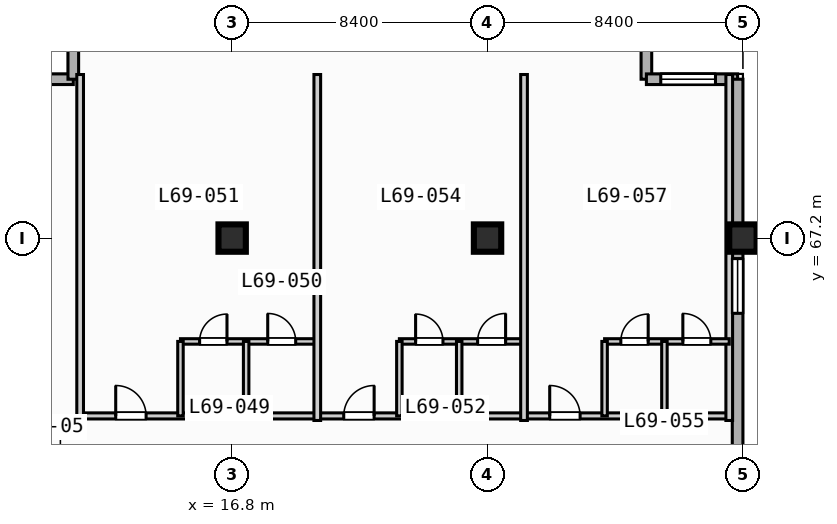
"""IFC4 building model, lengths in metres.
Left out: names, types, materials, properties, quantities, classifications, styles, units other than length and angle.
Written with IfcOpenShell. Run it as: python <this file> out.ifc"""

import sys

from ifc_helpers import new_model, si_unit, direction, frame, frame_2d, origin, origin_2d, place, context, subcontext, project, spatial, rectangle, extrude, element, fill, save


model = new_model("IFC4")
c1 = context("Model", 3, precision=1e-05, world=origin(), true_north=direction((0.0, 1.0)))
c2 = subcontext(c1, "Body", "Model", "MODEL_VIEW")
j1 = project(units=[si_unit("LENGTHUNIT", "METRE"), si_unit("PLANEANGLEUNIT", "RADIAN")], contexts=[c1])
p1 = place(None, origin())
s1 = spatial("IfcSite", under=j1, at=p1, CompositionType="ELEMENT")
p2 = place(p1, origin())
s2 = spatial("IfcBuilding", under=s1, at=p2, CompositionType="ELEMENT")
p3 = place(p2, frame((0.0, 0.0, 278.6)))
s3 = spatial("IfcBuildingStorey", under=s2, at=p3, CompositionType="ELEMENT", Elevation=278.6)
for number, where, z_axis, x_axis in (
    (1, (16.8, 67.2, 0.0), (0.0, 0.0, 1.0), (1.0, 0.0, 0.0)),
    (2, (25.2, 67.2, 0.0), (0.0, 0.0, 1.0), (1.0, 0.0, 0.0)),
    (3, (33.6, 67.2, 0.0), (0.0, 0.0, 1.0), (1.0, 0.0, 0.0)),
):
    element("IfcColumn", number, at=place(p3, frame(where, z_axis=z_axis, x_axis=x_axis)), inside=s3, PredefinedType="COLUMN", context=c2, shape_type="SweptSolid", body=[
        extrude(rectangle(XDim=0.9, YDim=0.9, at=origin_2d()), origin(), (0.0, 0.0, 1.0), 3.7),
    ])
for number, where, z_axis, x_axis in (
    (4, (8.575, 72.425, 0.0), (0.0, 0.0, 1.0), (1.0, 0.0, 0.0)),
    (5, (11.575, 72.425, 0.0), (0.0, 0.0, 1.0), (0.0, 1.0, 0.0)),
    (6, (30.425, 75.425, 0.0), (0.0, 0.0, 1.0), (0.0, -1.0, 0.0)),
):
    element("IfcWall", number, at=place(p3, frame(where, z_axis=z_axis, x_axis=x_axis)), inside=s3, PredefinedType="STANDARD", context=c2, shape_type="SweptSolid", body=[
        extrude(rectangle(XDim=3.0, YDim=0.35, at=frame_2d((1.5, 0.0))), origin(), (0.0, 0.0, 1.0), 3.47),
    ])
p4 = place(p3, frame((30.425, 72.425, 0.0), z_axis=(0.0, 0.0, 1.0), x_axis=(1.0, 0.0, 0.0)))
e7 = element("IfcWall", 7, at=p4, inside=s3, PredefinedType="STANDARD", context=c2, shape_type="SweptSolid", body=[
    extrude(rectangle(XDim=3.0, YDim=0.35, at=frame_2d((1.5, 0.0))), origin(), (0.0, 0.0, 1.0), 3.47),
])
p5 = place(p4, frame((0.472, 0.0, 0.85)))
e8 = element("IfcOpeningElement", 8, at=p5, cuts=e7, PredefinedType="OPENING", context=c2, shape_type="SweptSolid", body=[
    extrude(rectangle(XDim=1.8, YDim=1.8, at=frame_2d((0.9, 0.9))), frame((0.0, 0.185, 0.0), z_axis=(0.0, -1.0, 0.0), x_axis=(1.0, 0.0, 0.0)), (0.0, 0.0, 1.0), 0.37),
])
p6 = place(p3, frame((33.425, 72.425, 0.0), z_axis=(0.0, 0.0, 1.0), x_axis=(0.0, -1.0, 0.0)))
e9 = element("IfcWall", 9, at=p6, inside=s3, PredefinedType="STANDARD", context=c2, shape_type="SweptSolid", body=[
    extrude(rectangle(XDim=39.0, YDim=0.35, at=frame_2d((19.5, 0.0))), origin(), (0.0, 0.0, 1.0), 3.47),
])
p7 = place(p6, frame((5.9, 0.0, 0.85)))
e10 = element("IfcOpeningElement", 10, at=p7, cuts=e9, PredefinedType="OPENING", context=c2, shape_type="SweptSolid", body=[
    extrude(rectangle(XDim=1.8, YDim=1.8, at=frame_2d((0.9, 0.9))), frame((0.0, 0.185, 0.0), z_axis=(0.0, -1.0, 0.0), x_axis=(1.0, 0.0, 0.0)), (0.0, 0.0, 1.0), 0.37),
])
p8 = place(p3, frame((11.8, 61.35, 0.0), z_axis=(0.0, 0.0, 1.0), x_axis=(1.0, 0.0, 0.0)))
e11 = element("IfcWall", 11, at=p8, inside=s3, PredefinedType="PARTITIONING", context=c2, shape_type="SweptSolid", body=[
    extrude(rectangle(XDim=21.35, YDim=0.2, at=frame_2d((10.675, 0.0))), origin(), (0.0, 0.0, 1.0), 3.47),
])
p9 = place(p8, frame((1.17, 0.0, 0.0)))
e12 = element("IfcOpeningElement", 12, at=p9, cuts=e11, PredefinedType="OPENING", context=c2, shape_type="SweptSolid", body=[
    extrude(rectangle(XDim=1.0, YDim=2.15, at=frame_2d((0.5, 1.075))), frame((0.0, 0.11, 0.0), z_axis=(0.0, -1.0, 0.0), x_axis=(1.0, 0.0, 0.0)), (0.0, 0.0, 1.0), 0.22),
])
p10 = place(p8, frame((8.67, 0.0, 0.0)))
e13 = element("IfcOpeningElement", 13, at=p10, cuts=e11, PredefinedType="OPENING", context=c2, shape_type="SweptSolid", body=[
    extrude(rectangle(XDim=1.0, YDim=2.15, at=frame_2d((0.5, 1.075))), frame((0.0, 0.11, 0.0), z_axis=(0.0, -1.0, 0.0), x_axis=(1.0, 0.0, 0.0)), (0.0, 0.0, 1.0), 0.22),
])
p11 = place(p8, frame((15.445, 0.0, 0.0)))
e14 = element("IfcOpeningElement", 14, at=p11, cuts=e11, PredefinedType="OPENING", context=c2, shape_type="SweptSolid", body=[
    extrude(rectangle(XDim=1.0, YDim=2.15, at=frame_2d((0.5, 1.075))), frame((0.0, 0.11, 0.0), z_axis=(0.0, -1.0, 0.0), x_axis=(1.0, 0.0, 0.0)), (0.0, 0.0, 1.0), 0.22),
])
p12 = place(p3, frame((11.8, 61.2, 0.0), z_axis=(0.0, 0.0, 1.0), x_axis=(0.0, 1.0, 0.0)))
e15 = element("IfcWall", 15, at=p12, inside=s3, PredefinedType="PARTITIONING", context=c2, shape_type="SweptSolid", body=[
    extrude(rectangle(XDim=11.38, YDim=0.22, at=frame_2d((5.69, 0.0))), origin(), (0.0, 0.0, 1.0), 3.47),
])
p13 = place(p3, frame((15.1, 63.8, 0.0), z_axis=(0.0, 0.0, 1.0), x_axis=(1.0, 0.0, 0.0)))
e16 = element("IfcWall", 16, at=p13, inside=s3, PredefinedType="PLUMBINGWALL", context=c2, shape_type="SweptSolid", body=[
    extrude(rectangle(XDim=4.5, YDim=0.18, at=frame_2d((2.25, 0.0))), origin(), (0.0, 0.0, 1.0), 3.47),
])
p14 = place(p13, frame((0.63, 0.0, 0.0)))
e17 = element("IfcOpeningElement", 17, at=p14, cuts=e16, PredefinedType="OPENING", context=c2, shape_type="SweptSolid", body=[
    extrude(rectangle(XDim=0.9, YDim=2.1, at=frame_2d((0.45, 1.05))), frame((0.0, 0.1, 0.0), z_axis=(0.0, -1.0, 0.0), x_axis=(1.0, 0.0, 0.0)), (0.0, 0.0, 1.0), 0.2),
])
p15 = place(p13, frame((2.87, 0.0, 0.0)))
e18 = element("IfcOpeningElement", 18, at=p15, cuts=e16, PredefinedType="OPENING", context=c2, shape_type="SweptSolid", body=[
    extrude(rectangle(XDim=0.92, YDim=2.1, at=frame_2d((0.46, 1.05))), frame((0.0, 0.1, 0.0), z_axis=(0.0, -1.0, 0.0), x_axis=(1.0, 0.0, 0.0)), (0.0, 0.0, 1.0), 0.2),
])
for number, where, z_axis, x_axis in (
    (19, (15.1, 61.35, 0.0), (0.0, 0.0, 1.0), (0.0, 1.0, 0.0)),
    (20, (17.26, 61.35, 0.0), (0.0, 0.0, 1.0), (0.0, 1.0, 0.0)),
):
    element("IfcWall", number, at=place(p3, frame(where, z_axis=z_axis, x_axis=x_axis)), inside=s3, PredefinedType="PLUMBINGWALL", context=c2, shape_type="SweptSolid", body=[
        extrude(rectangle(XDim=2.45, YDim=0.18, at=frame_2d((1.225, 0.0))), origin(), (0.0, 0.0, 1.0), 3.47),
    ])
p16 = place(p3, frame((19.6, 61.2, 0.0), z_axis=(0.0, 0.0, 1.0), x_axis=(0.0, 1.0, 0.0)))
e21 = element("IfcWall", 21, at=p16, inside=s3, PredefinedType="PARTITIONING", context=c2, shape_type="SweptSolid", body=[
    extrude(rectangle(XDim=11.38, YDim=0.22, at=frame_2d((5.69, 0.0))), origin(), (0.0, 0.0, 1.0), 3.47),
])
p17 = place(p3, frame((22.3, 63.8, 0.0), z_axis=(0.0, 0.0, 1.0), x_axis=(1.0, 0.0, 0.0)))
e22 = element("IfcWall", 22, at=p17, inside=s3, PredefinedType="PLUMBINGWALL", context=c2, shape_type="SweptSolid", body=[
    extrude(rectangle(XDim=4.1, YDim=0.18, at=frame_2d((2.05, 0.0))), origin(), (0.0, 0.0, 1.0), 3.47),
])
p18 = place(p17, frame((0.534, 0.0, 0.0)))
e23 = element("IfcOpeningElement", 23, at=p18, cuts=e22, PredefinedType="OPENING", context=c2, shape_type="SweptSolid", body=[
    extrude(rectangle(XDim=0.9, YDim=2.1, at=frame_2d((0.45, 1.05))), frame((0.0, 0.1, 0.0), z_axis=(0.0, -1.0, 0.0), x_axis=(1.0, 0.0, 0.0)), (0.0, 0.0, 1.0), 0.2),
])
p19 = place(p17, frame((2.574, 0.0, 0.0)))
e24 = element("IfcOpeningElement", 24, at=p19, cuts=e22, PredefinedType="OPENING", context=c2, shape_type="SweptSolid", body=[
    extrude(rectangle(XDim=0.92, YDim=2.1, at=frame_2d((0.46, 1.05))), frame((0.0, 0.1, 0.0), z_axis=(0.0, -1.0, 0.0), x_axis=(1.0, 0.0, 0.0)), (0.0, 0.0, 1.0), 0.2),
])
for number, where, z_axis, x_axis in (
    (25, (22.3, 61.35, 0.0), (0.0, 0.0, 1.0), (0.0, 1.0, 0.0)),
    (26, (24.268, 61.35, 0.0), (0.0, 0.0, 1.0), (0.0, 1.0, 0.0)),
):
    element("IfcWall", number, at=place(p3, frame(where, z_axis=z_axis, x_axis=x_axis)), inside=s3, PredefinedType="PLUMBINGWALL", context=c2, shape_type="SweptSolid", body=[
        extrude(rectangle(XDim=2.45, YDim=0.18, at=frame_2d((1.225, 0.0))), origin(), (0.0, 0.0, 1.0), 3.47),
    ])
for number, where, z_axis, x_axis in (
    (27, (26.4, 61.2, 0.0), (0.0, 0.0, 1.0), (0.0, 1.0, 0.0)),
    (28, (33.15, 61.2, 0.0), (0.0, 0.0, 1.0), (0.0, 1.0, 0.0)),
):
    element("IfcWall", number, at=place(p3, frame(where, z_axis=z_axis, x_axis=x_axis)), inside=s3, PredefinedType="PARTITIONING", context=c2, shape_type="SweptSolid", body=[
        extrude(rectangle(XDim=11.38, YDim=0.22, at=frame_2d((5.69, 0.0))), origin(), (0.0, 0.0, 1.0), 3.47),
    ])
p20 = place(p3, frame((29.05, 63.8, 0.0), z_axis=(0.0, 0.0, 1.0), x_axis=(1.0, 0.0, 0.0)))
e29 = element("IfcWall", 29, at=p20, inside=s3, PredefinedType="PLUMBINGWALL", context=c2, shape_type="SweptSolid", body=[
    extrude(rectangle(XDim=4.1, YDim=0.18, at=frame_2d((2.05, 0.0))), origin(), (0.0, 0.0, 1.0), 3.47),
])
p21 = place(p20, frame((0.534, 0.0, 0.0)))
e30 = element("IfcOpeningElement", 30, at=p21, cuts=e29, PredefinedType="OPENING", context=c2, shape_type="SweptSolid", body=[
    extrude(rectangle(XDim=0.9, YDim=2.1, at=frame_2d((0.45, 1.05))), frame((0.0, 0.1, 0.0), z_axis=(0.0, -1.0, 0.0), x_axis=(1.0, 0.0, 0.0)), (0.0, 0.0, 1.0), 0.2),
])
p22 = place(p20, frame((2.574, 0.0, 0.0)))
e31 = element("IfcOpeningElement", 31, at=p22, cuts=e29, PredefinedType="OPENING", context=c2, shape_type="SweptSolid", body=[
    extrude(rectangle(XDim=0.92, YDim=2.1, at=frame_2d((0.46, 1.05))), frame((0.0, 0.1, 0.0), z_axis=(0.0, -1.0, 0.0), x_axis=(1.0, 0.0, 0.0)), (0.0, 0.0, 1.0), 0.2),
])
for number, where, z_axis, x_axis in (
    (32, (29.05, 61.35, 0.0), (0.0, 0.0, 1.0), (0.0, 1.0, 0.0)),
    (33, (31.018, 61.35, 0.0), (0.0, 0.0, 1.0), (0.0, 1.0, 0.0)),
):
    element("IfcWall", number, at=place(p3, frame(where, z_axis=z_axis, x_axis=x_axis)), inside=s3, PredefinedType="PLUMBINGWALL", context=c2, shape_type="SweptSolid", body=[
        extrude(rectangle(XDim=2.45, YDim=0.18, at=frame_2d((1.225, 0.0))), origin(), (0.0, 0.0, 1.0), 3.47),
    ])
p23 = place(p5, origin())
e34 = element("IfcWindow", 34, at=p23, inside=s3, PartitioningType="SINGLE_PANEL", PredefinedType="WINDOW", context=c2, shape_type="SweptSolid", body=[
    extrude(rectangle(XDim=1.8, YDim=1.8, at=frame_2d((0.9, 0.9))), frame((0.0, 0.03, 0.0), z_axis=(0.0, -1.0, 0.0), x_axis=(1.0, 0.0, 0.0)), (0.0, 0.0, 1.0), 0.06),
])
fill(e8, e34)
p24 = place(p7, origin())
e35 = element("IfcWindow", 35, at=p24, inside=s3, PartitioningType="SINGLE_PANEL", PredefinedType="WINDOW", context=c2, shape_type="SweptSolid", body=[
    extrude(rectangle(XDim=1.8, YDim=1.8, at=frame_2d((0.9, 0.9))), frame((0.0, 0.03, 0.0), z_axis=(0.0, -1.0, 0.0), x_axis=(1.0, 0.0, 0.0)), (0.0, 0.0, 1.0), 0.06),
])
fill(e10, e35)
p25 = place(p9, origin())
e36 = element("IfcDoor", 36, at=p25, inside=s3, OperationType="SINGLE_SWING_LEFT", PredefinedType="DOOR", context=c2, shape_type="SweptSolid", body=[
    extrude(rectangle(XDim=1.0, YDim=2.15, at=frame_2d((0.5, 1.075))), frame((0.0, 0.025, 0.0), z_axis=(0.0, -1.0, 0.0), x_axis=(1.0, 0.0, 0.0)), (0.0, 0.0, 1.0), 0.05),
])
fill(e12, e36)
p26 = place(p10, origin())
e37 = element("IfcDoor", 37, at=p26, inside=s3, OperationType="SINGLE_SWING_RIGHT", PredefinedType="DOOR", context=c2, shape_type="SweptSolid", body=[
    extrude(rectangle(XDim=1.0, YDim=2.15, at=frame_2d((0.5, 1.075))), frame((0.0, 0.025, 0.0), z_axis=(0.0, -1.0, 0.0), x_axis=(1.0, 0.0, 0.0)), (0.0, 0.0, 1.0), 0.05),
])
fill(e13, e37)
p27 = place(p11, origin())
e38 = element("IfcDoor", 38, at=p27, inside=s3, OperationType="SINGLE_SWING_LEFT", PredefinedType="DOOR", context=c2, shape_type="SweptSolid", body=[
    extrude(rectangle(XDim=1.0, YDim=2.15, at=frame_2d((0.5, 1.075))), frame((0.0, 0.025, 0.0), z_axis=(0.0, -1.0, 0.0), x_axis=(1.0, 0.0, 0.0)), (0.0, 0.0, 1.0), 0.05),
])
fill(e14, e38)
p28 = place(p14, origin())
e39 = element("IfcDoor", 39, at=p28, inside=s3, OperationType="SINGLE_SWING_RIGHT", PredefinedType="DOOR", context=c2, shape_type="SweptSolid", body=[
    extrude(rectangle(XDim=0.9, YDim=2.1, at=frame_2d((0.45, 1.05))), frame((0.0, 0.025, 0.0), z_axis=(0.0, -1.0, 0.0), x_axis=(1.0, 0.0, 0.0)), (0.0, 0.0, 1.0), 0.05),
])
fill(e17, e39)
p29 = place(p15, origin())
e40 = element("IfcDoor", 40, at=p29, inside=s3, OperationType="SINGLE_SWING_LEFT", PredefinedType="DOOR", context=c2, shape_type="SweptSolid", body=[
    extrude(rectangle(XDim=0.92, YDim=2.1, at=frame_2d((0.46, 1.05))), frame((0.0, 0.025, 0.0), z_axis=(0.0, -1.0, 0.0), x_axis=(1.0, 0.0, 0.0)), (0.0, 0.0, 1.0), 0.05),
])
fill(e18, e40)
p30 = place(p18, origin())
e41 = element("IfcDoor", 41, at=p30, inside=s3, OperationType="SINGLE_SWING_LEFT", PredefinedType="DOOR", context=c2, shape_type="SweptSolid", body=[
    extrude(rectangle(XDim=0.9, YDim=2.1, at=frame_2d((0.45, 1.05))), frame((0.0, 0.025, 0.0), z_axis=(0.0, -1.0, 0.0), x_axis=(1.0, 0.0, 0.0)), (0.0, 0.0, 1.0), 0.05),
])
fill(e23, e41)
p31 = place(p19, origin())
e42 = element("IfcDoor", 42, at=p31, inside=s3, OperationType="SINGLE_SWING_RIGHT", PredefinedType="DOOR", context=c2, shape_type="SweptSolid", body=[
    extrude(rectangle(XDim=0.92, YDim=2.1, at=frame_2d((0.46, 1.05))), frame((0.0, 0.025, 0.0), z_axis=(0.0, -1.0, 0.0), x_axis=(1.0, 0.0, 0.0)), (0.0, 0.0, 1.0), 0.05),
])
fill(e24, e42)
p32 = place(p21, origin())
e43 = element("IfcDoor", 43, at=p32, inside=s3, OperationType="SINGLE_SWING_RIGHT", PredefinedType="DOOR", context=c2, shape_type="SweptSolid", body=[
    extrude(rectangle(XDim=0.9, YDim=2.1, at=frame_2d((0.45, 1.05))), frame((0.0, 0.025, 0.0), z_axis=(0.0, -1.0, 0.0), x_axis=(1.0, 0.0, 0.0)), (0.0, 0.0, 1.0), 0.05),
])
fill(e30, e43)
p33 = place(p22, origin())
e44 = element("IfcDoor", 44, at=p33, inside=s3, OperationType="SINGLE_SWING_LEFT", PredefinedType="DOOR", context=c2, shape_type="SweptSolid", body=[
    extrude(rectangle(XDim=0.92, YDim=2.1, at=frame_2d((0.46, 1.05))), frame((0.0, 0.025, 0.0), z_axis=(0.0, -1.0, 0.0), x_axis=(1.0, 0.0, 0.0)), (0.0, 0.0, 1.0), 0.05),
])
fill(e31, e44)
save(model, sys.argv[1])
